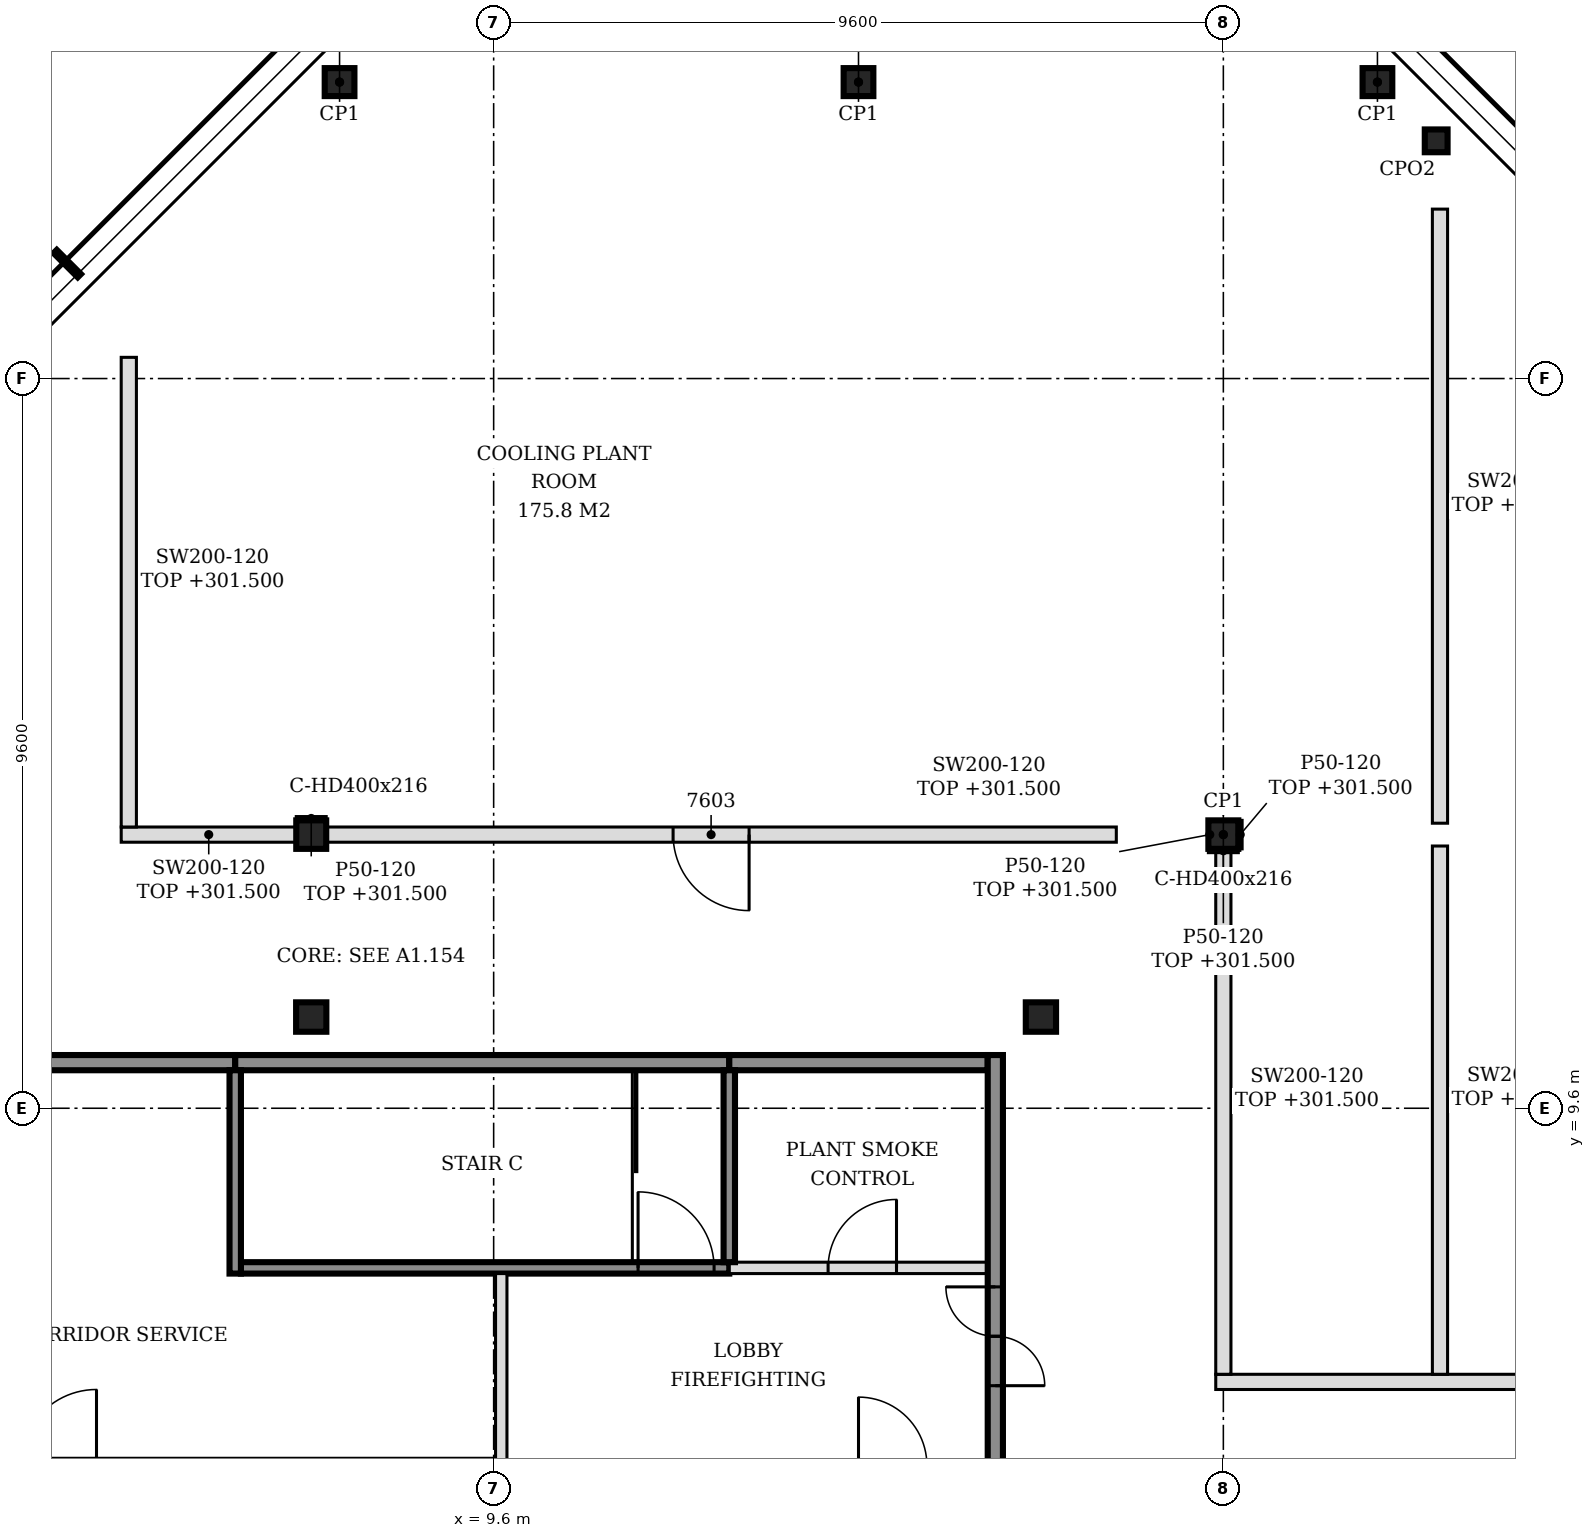
"""IFC4 building model, lengths in metres.
Left out: names, types, materials, properties, quantities, classifications, styles, units other than length and angle.
Written with IfcOpenShell. Run it as: python <this file> out.ifc"""

import sys

from ifc_helpers import new_model, si_unit, direction, frame, frame_2d, origin, origin_2d, place, context, subcontext, project, spatial, rectangle, hollow_rectangle, i_section, extrude, clip, halfspace, element, fill, save


model = new_model("IFC4")
c1 = context("Model", 3, precision=1e-05, world=origin(), true_north=direction((0.0, 1.0)))
c2 = subcontext(c1, "Body", "Model", "MODEL_VIEW")
j1 = project(units=[si_unit("LENGTHUNIT", "METRE"), si_unit("PLANEANGLEUNIT", "RADIAN")], contexts=[c1])
p1 = place(None, origin())
s1 = spatial("IfcSite", under=j1, at=p1, CompositionType="ELEMENT")
p2 = place(p1, origin())
s2 = spatial("IfcBuilding", under=s1, at=p2, CompositionType="ELEMENT")
p3 = place(p2, frame((0.0, 0.0, 295.8)))
s3 = spatial("IfcBuildingStorey", under=s2, at=p3, CompositionType="ELEMENT", Elevation=295.8)
p4 = place(p3, frame((22.0, 22.327, 5.7), z_axis=(0.0, 0.0, 1.0), x_axis=(1.0, 0.0, 0.0)))
e1 = element("IfcColumn", 1, at=p4, inside=s3, PredefinedType="COLUMN", context=c2, shape_type="SweptSolid", body=[
    extrude(hollow_rectangle(XDim=0.3, YDim=0.3, WallThickness=0.016, InnerFilletRadius=0.016, OuterFilletRadius=0.024, at=origin_2d()), origin(), (0.0, 0.0, 1.0), 12.323),
])
p5 = place(p3, frame((21.227, 23.1, 5.7), z_axis=(0.0, 0.0, 1.0), x_axis=(1.0, 0.0, 0.0)))
e2 = element("IfcColumn", 2, at=p5, inside=s3, PredefinedType="COLUMN", context=c2, shape_type="SweptSolid", body=[
    extrude(hollow_rectangle(XDim=0.3, YDim=0.3, WallThickness=0.016, InnerFilletRadius=0.016, OuterFilletRadius=0.024, at=origin_2d()), origin(), (0.0, 0.0, 1.0), 12.202),
])
p6 = place(p3, frame((14.4, 23.1, 5.7), z_axis=(0.0, 0.0, 1.0), x_axis=(1.0, 0.0, 0.0)))
e3 = element("IfcColumn", 3, at=p6, inside=s3, PredefinedType="COLUMN", context=c2, shape_type="SweptSolid", body=[
    extrude(hollow_rectangle(XDim=0.3, YDim=0.3, WallThickness=0.016, InnerFilletRadius=0.016, OuterFilletRadius=0.024, at=origin_2d()), origin(), (0.0, 0.0, 1.0), 9.491),
])
p7 = place(p3, frame((7.573, 23.1, 5.7), z_axis=(0.0, 0.0, 1.0), x_axis=(1.0, 0.0, 0.0)))
e4 = element("IfcColumn", 4, at=p7, inside=s3, PredefinedType="COLUMN", context=c2, shape_type="SweptSolid", body=[
    extrude(hollow_rectangle(XDim=0.3, YDim=0.3, WallThickness=0.016, InnerFilletRadius=0.016, OuterFilletRadius=0.024, at=origin_2d()), origin(), (0.0, 0.0, 1.0), 6.781),
])
p8 = place(p3, frame((7.2, 10.8, 5.7), z_axis=(0.0, 0.0, 1.0), x_axis=(1.0, 0.0, 0.0)))
e5 = element("IfcColumn", 5, at=p8, inside=s3, PredefinedType="COLUMN", context=c2, shape_type="SweptSolid", body=[
    extrude(hollow_rectangle(XDim=0.3, YDim=0.3, WallThickness=0.016, InnerFilletRadius=0.016, OuterFilletRadius=0.024, at=origin_2d()), origin(), (0.0, 0.0, 1.0), 6.632),
])
p9 = place(p3, frame((19.2, 13.2, 5.7), z_axis=(0.214971196898, 0.0, 0.97662038915), x_axis=(0.0, 1.0, 0.0)))
e6 = element("IfcColumn", 6, at=p9, inside=s3, PredefinedType="COLUMN", context=c2, shape_type="Clipping", body=[
    clip(extrude(hollow_rectangle(XDim=0.3, YDim=0.3, WallThickness=0.016, InnerFilletRadius=0.016, OuterFilletRadius=0.024, at=origin_2d()), origin(), (0.0, 0.0, 1.0), 13.025), halfspace(frame((0.0, 0.0, 0.032), z_axis=(0.0, 0.0, 1.0), x_axis=(1.0, 0.0, 0.0)), True)),
])
for number, where, z_axis, x_axis in (
    (7, (21.227, 23.1, -0.2), (0.0, 0.0, 1.0), (1.0, 0.0, 0.0)),
    (8, (14.4, 23.1, -0.2), (0.0, 0.0, 1.0), (1.0, 0.0, 0.0)),
    (9, (7.573, 23.1, -0.2), (0.0, 0.0, 1.0), (1.0, 0.0, 0.0)),
):
    element("IfcColumn", number, at=place(p3, frame(where, z_axis=z_axis, x_axis=x_axis)), inside=s3, PredefinedType="COLUMN", context=c2, shape_type="SweptSolid", body=[
        extrude(i_section(OverallWidth=0.391, OverallDepth=0.368, WebThickness=0.015, FlangeThickness=0.024, FilletRadius=0.015, at=origin_2d()), origin(), (0.0, 0.0, 1.0), 5.9),
    ])
for number, where, z_axis, x_axis in (
    (10, (7.2, 13.2, -0.2), (0.0, 0.0, 1.0), (1.0, 0.0, 0.0)),
    (11, (19.2, 13.2, -0.2), (0.0, 0.0, 1.0), (1.0, 0.0, 0.0)),
):
    element("IfcColumn", number, at=place(p3, frame(where, z_axis=z_axis, x_axis=x_axis)), inside=s3, PredefinedType="COLUMN", context=c2, shape_type="SweptSolid", body=[
        extrude(i_section(OverallWidth=0.394, OverallDepth=0.375, WebThickness=0.017, FlangeThickness=0.028, FilletRadius=0.015, at=origin_2d()), origin(), (0.0, 0.0, 1.0), 5.9),
    ])
for number, where, z_axis, x_axis in (
    (12, (7.2, 10.8, -0.2), (0.0, 0.0, 1.0), (1.0, 0.0, 0.0)),
    (13, (16.8, 10.8, -0.2), (0.0, 0.0, 1.0), (1.0, 0.0, 0.0)),
):
    element("IfcColumn", number, at=place(p3, frame(where, z_axis=z_axis, x_axis=x_axis)), inside=s3, PredefinedType="COLUMN", context=c2, shape_type="SweptSolid", body=[
        extrude(i_section(OverallWidth=0.398, OverallDepth=0.387, WebThickness=0.021, FlangeThickness=0.033, FilletRadius=0.015, at=origin_2d()), origin(), (0.0, 0.0, 1.0), 5.9),
    ])
p10 = place(p3, frame((6.275, 7.5, 0.0), z_axis=(0.0, 0.0, 1.0), x_axis=(1.0, 0.0, 0.0)))
e14 = element("IfcWall", 14, at=p10, inside=s3, PredefinedType="SOLIDWALL", context=c2, shape_type="SweptSolid", body=[
    extrude(rectangle(XDim=6.425, YDim=0.15, at=frame_2d((3.212, 0.0))), origin(), (0.0, 0.0, 1.0), 5.7),
])
p11 = place(p10, frame((5.225, 0.0, 0.0)))
e15 = element("IfcOpeningElement", 15, at=p11, cuts=e14, PredefinedType="OPENING", context=c2, shape_type="SweptSolid", body=[
    extrude(rectangle(XDim=1.0, YDim=2.1, at=frame_2d((0.5, 1.05))), frame((0.0, 0.085, 0.0), z_axis=(0.0, -1.0, 0.0), x_axis=(1.0, 0.0, 0.0)), (0.0, 0.0, 1.0), 0.17),
])
p12 = place(p3, frame((12.7, 7.5, 0.0), z_axis=(0.0, 0.0, 1.0), x_axis=(1.0, 0.0, 0.0)))
e16 = element("IfcWall", 16, at=p12, inside=s3, PredefinedType="SOLIDWALL", context=c2, shape_type="SweptSolid", body=[
    extrude(rectangle(XDim=3.4, YDim=0.15, at=frame_2d((1.7, 0.0))), origin(), (0.0, 0.0, 1.0), 5.7),
])
p13 = place(p12, frame((1.3, 0.0, 0.0)))
e17 = element("IfcOpeningElement", 17, at=p13, cuts=e16, PredefinedType="OPENING", context=c2, shape_type="SweptSolid", body=[
    extrude(rectangle(XDim=0.9, YDim=2.1, at=frame_2d((0.45, 1.05))), frame((0.0, 0.085, 0.0), z_axis=(0.0, -1.0, 0.0), x_axis=(1.0, 0.0, 0.0)), (0.0, 0.0, 1.0), 0.17),
])
p14 = place(p3, frame((-1.7, 10.2, 0.0), z_axis=(0.0, 0.0, 1.0), x_axis=(1.0, 0.0, 0.0)))
e18 = element("IfcWall", 18, at=p14, inside=s3, PredefinedType="SOLIDWALL", context=c2, shape_type="SweptSolid", body=[
    extrude(rectangle(XDim=7.9, YDim=0.2, at=frame_2d((3.95, 0.0))), origin(), (0.0, 0.0, 1.0), 5.7),
])
p15 = place(p3, frame((6.2, 10.2, 0.0), z_axis=(0.0, 0.0, 1.0), x_axis=(1.0, 0.0, 0.0)))
e19 = element("IfcWall", 19, at=p15, inside=s3, PredefinedType="SOLIDWALL", context=c2, shape_type="SweptSolid", body=[
    extrude(rectangle(XDim=6.5, YDim=0.2, at=frame_2d((3.25, 0.0))), origin(), (0.0, 0.0, 1.0), 5.7),
])
p16 = place(p3, frame((12.7, 10.2, 0.0), z_axis=(0.0, 0.0, 1.0), x_axis=(1.0, 0.0, 0.0)))
e20 = element("IfcWall", 20, at=p16, inside=s3, PredefinedType="SOLIDWALL", context=c2, shape_type="SweptSolid", body=[
    extrude(rectangle(XDim=3.4, YDim=0.2, at=frame_2d((1.7, 0.0))), origin(), (0.0, 0.0, 1.0), 5.7),
])
p17 = place(p3, frame((6.2, 7.425, 0.0), z_axis=(0.0, 0.0, 1.0), x_axis=(0.0, 1.0, 0.0)))
e21 = element("IfcWall", 21, at=p17, inside=s3, PredefinedType="SOLIDWALL", context=c2, shape_type="SweptSolid", body=[
    extrude(rectangle(XDim=2.675, YDim=0.15, at=frame_2d((1.337, 0.0))), origin(), (0.0, 0.0, 1.0), 5.7),
])
p18 = place(p3, frame((9.7, 4.975, 0.0), z_axis=(0.0, 0.0, 1.0), x_axis=(0.0, 1.0, 0.0)))
e22 = element("IfcWall", 22, at=p18, inside=s3, PredefinedType="SOLIDWALL", context=c2, shape_type="SweptSolid", body=[
    extrude(rectangle(XDim=2.45, YDim=0.15, at=frame_2d((1.225, 0.0))), origin(), (0.0, 0.0, 1.0), 5.7),
])
p19 = place(p3, frame((12.7, 7.575, 0.0), z_axis=(0.0, 0.0, 1.0), x_axis=(0.0, 1.0, 0.0)))
e23 = element("IfcWall", 23, at=p19, inside=s3, PredefinedType="SOLIDWALL", context=c2, shape_type="SweptSolid", body=[
    extrude(rectangle(XDim=2.525, YDim=0.15, at=frame_2d((1.263, 0.0))), origin(), (0.0, 0.0, 1.0), 5.7),
])
p20 = place(p3, frame((16.2, -5.5, 0.0), z_axis=(0.0, 0.0, 1.0), x_axis=(0.0, 1.0, 0.0)))
e24 = element("IfcWall", 24, at=p20, inside=s3, PredefinedType="SOLIDWALL", context=c2, shape_type="SweptSolid", body=[
    extrude(rectangle(XDim=15.8, YDim=0.2, at=frame_2d((7.9, 0.0))), origin(), (0.0, 0.0, 1.0), 5.7),
])
p21 = place(p20, frame((3.05, 0.0, 0.0)))
e25 = element("IfcOpeningElement", 25, at=p21, cuts=e24, PredefinedType="OPENING", context=c2, shape_type="SweptSolid", body=[
    extrude(rectangle(XDim=1.3, YDim=2.1, at=frame_2d((0.65, 1.05))), frame((0.0, 0.11, 0.0), z_axis=(0.0, -1.0, 0.0), x_axis=(1.0, 0.0, 0.0)), (0.0, 0.0, 1.0), 0.22),
])
p22 = place(p20, frame((11.45, 0.0, 0.0)))
e26 = element("IfcOpeningElement", 26, at=p22, cuts=e24, PredefinedType="OPENING", context=c2, shape_type="SweptSolid", body=[
    extrude(rectangle(XDim=1.3, YDim=2.1, at=frame_2d((0.65, 1.05))), frame((0.0, 0.11, 0.0), z_axis=(0.0, -1.0, 0.0), x_axis=(1.0, 0.0, 0.0)), (0.0, 0.0, 1.0), 0.22),
])
p23 = place(p3, frame((19.1, 6.0, 0.0), z_axis=(0.0, 0.0, 1.0), x_axis=(1.0, 0.0, 0.0)))
e27 = element("IfcWall", 27, at=p23, inside=s3, PredefinedType="PARTITIONING", context=c2, shape_type="SweptSolid", body=[
    extrude(rectangle(XDim=18.379, YDim=0.2, at=frame_2d((9.189, 0.0))), origin(), (0.0, 0.0, 1.0), 5.7),
])
p24 = place(p23, frame((10.164, 0.0, 0.0)))
e28 = element("IfcOpeningElement", 28, at=p24, cuts=e27, PredefinedType="OPENING", context=c2, shape_type="SweptSolid", body=[
    extrude(rectangle(XDim=1.0, YDim=2.1, at=frame_2d((0.5, 1.05))), frame((0.0, 0.11, 0.0), z_axis=(0.0, -1.0, 0.0), x_axis=(1.0, 0.0, 0.0)), (0.0, 0.0, 1.0), 0.22),
])
p25 = place(p3, frame((19.2, 6.1, 0.0), z_axis=(0.0, 0.0, 1.0), x_axis=(0.0, 1.0, 0.0)))
e29 = element("IfcWall", 29, at=p25, inside=s3, PredefinedType="PARTITIONING", context=c2, shape_type="SweptSolid", body=[
    extrude(rectangle(XDim=6.912, YDim=0.2, at=frame_2d((3.456, 0.0))), origin(), (0.0, 0.0, 1.0), 5.7),
])
p26 = place(p3, frame((22.05, 6.1, 0.0), z_axis=(0.0, 0.0, 1.0), x_axis=(0.0, 1.0, 0.0)))
e30 = element("IfcWall", 30, at=p26, inside=s3, PredefinedType="PARTITIONING", context=c2, shape_type="SweptSolid", body=[
    extrude(rectangle(XDim=6.95, YDim=0.2, at=frame_2d((3.475, 0.0))), origin(), (0.0, 0.0, 1.0), 5.7),
])
p27 = place(p3, frame((4.7, 13.2, 0.0), z_axis=(0.0, 0.0, 1.0), x_axis=(1.0, 0.0, 0.0)))
e31 = element("IfcWall", 31, at=p27, inside=s3, PredefinedType="PARTITIONING", context=c2, shape_type="SweptSolid", body=[
    extrude(rectangle(XDim=2.303, YDim=0.2, at=frame_2d((1.151, 0.0))), origin(), (0.0, 0.0, 1.0), 5.7),
])
p28 = place(p3, frame((7.397, 13.2, 0.0), z_axis=(0.0, 0.0, 1.0), x_axis=(1.0, 0.0, 0.0)))
e32 = element("IfcWall", 32, at=p28, inside=s3, PredefinedType="PARTITIONING", context=c2, shape_type="SweptSolid", body=[
    extrude(rectangle(XDim=10.395, YDim=0.2, at=frame_2d((5.197, 0.0))), origin(), (0.0, 0.0, 1.0), 5.7),
])
p29 = place(p28, frame((4.564, 0.0, 0.0)))
e33 = element("IfcOpeningElement", 33, at=p29, cuts=e32, PredefinedType="OPENING", context=c2, shape_type="SweptSolid", body=[
    extrude(rectangle(XDim=1.0, YDim=2.1, at=frame_2d((0.5, 1.05))), frame((0.0, 0.11, 0.0), z_axis=(0.0, -1.0, 0.0), x_axis=(1.0, 0.0, 0.0)), (0.0, 0.0, 1.0), 0.22),
])
p30 = place(p3, frame((4.8, 13.3, 0.0), z_axis=(0.0, 0.0, 1.0), x_axis=(0.0, 1.0, 0.0)))
e34 = element("IfcWall", 34, at=p30, inside=s3, PredefinedType="PARTITIONING", context=c2, shape_type="SweptSolid", body=[
    extrude(rectangle(XDim=6.179, YDim=0.2, at=frame_2d((3.089, 0.0))), origin(), (0.0, 0.0, 1.0), 5.7),
])
p31 = place(p3, frame((22.05, 13.35, 0.0), z_axis=(0.0, 0.0, 1.0), x_axis=(0.0, 1.0, 0.0)))
e35 = element("IfcWall", 35, at=p31, inside=s3, PredefinedType="PARTITIONING", context=c2, shape_type="SweptSolid", body=[
    extrude(rectangle(XDim=8.079, YDim=0.2, at=frame_2d((4.04, 0.0))), origin(), (0.0, 0.0, 1.0), 5.7),
])
p32 = place(p3, frame((19.422, 13.012, 0.0), z_axis=(0.0, 0.0, 1.0), x_axis=(0.0, 1.0, 0.0)))
e36 = element("IfcWall", 36, at=p32, inside=s3, PredefinedType="PARTITIONING", context=c2, shape_type="SweptSolid", body=[
    extrude(rectangle(XDim=0.375, YDim=0.05, at=frame_2d((0.188, 0.0))), origin(), (0.0, 0.0, 1.0), 5.7),
])
p33 = place(p3, frame((19.021, 13.05, 0.0), z_axis=(0.0, 0.0, 1.0), x_axis=(0.0, 1.0, 0.0)))
e37 = element("IfcWall", 37, at=p33, inside=s3, PredefinedType="PARTITIONING", context=c2, shape_type="SweptSolid", body=[
    extrude(rectangle(XDim=0.3, YDim=0.05, at=frame_2d((0.15, 0.0))), origin(), (0.0, 0.0, 1.0), 5.7),
])
for number, where, z_axis, x_axis in (
    (38, (7.003, 13.413, 0.0), (0.0, 0.0, 1.0), (1.0, 0.0, 0.0)),
    (39, (19.003, 12.988, 0.0), (0.0, 0.0, 1.0), (1.0, 0.0, 0.0)),
):
    element("IfcWall", number, at=place(p3, frame(where, z_axis=z_axis, x_axis=x_axis)), inside=s3, PredefinedType="PARTITIONING", context=c2, shape_type="SweptSolid", body=[
        extrude(rectangle(XDim=0.394, YDim=0.05, at=frame_2d((0.197, 0.0))), origin(), (0.0, 0.0, 1.0), 5.7),
    ])
p34 = place(p11, origin())
e40 = element("IfcDoor", 40, at=p34, inside=s3, OperationType="SINGLE_SWING_LEFT", PredefinedType="DOOR", context=c2, shape_type="SweptSolid", body=[
    extrude(rectangle(XDim=1.0, YDim=2.1, at=frame_2d((0.5, 1.05))), frame((0.0, 0.025, 0.0), z_axis=(0.0, -1.0, 0.0), x_axis=(1.0, 0.0, 0.0)), (0.0, 0.0, 1.0), 0.05),
])
fill(e15, e40)
p35 = place(p22, origin())
e41 = element("IfcDoor", 41, at=p35, inside=s3, OperationType="DOUBLE_DOOR_SINGLE_SWING", PredefinedType="DOOR", context=c2, shape_type="SweptSolid", body=[
    extrude(rectangle(XDim=1.3, YDim=2.1, at=frame_2d((0.65, 1.05))), frame((0.0, 0.025, 0.0), z_axis=(0.0, -1.0, 0.0), x_axis=(1.0, 0.0, 0.0)), (0.0, 0.0, 1.0), 0.05),
])
fill(e26, e41)
p36 = place(p13, origin())
e42 = element("IfcDoor", 42, at=p36, inside=s3, OperationType="SINGLE_SWING_RIGHT", PredefinedType="DOOR", context=c2, shape_type="SweptSolid", body=[
    extrude(rectangle(XDim=0.9, YDim=2.1, at=frame_2d((0.45, 1.05))), frame((0.0, 0.025, 0.0), z_axis=(0.0, -1.0, 0.0), x_axis=(1.0, 0.0, 0.0)), (0.0, 0.0, 1.0), 0.05),
])
fill(e17, e42)
p37 = place(p29, frame((1.0, 0.0, 0.0), z_axis=(0.0, 0.0, 1.0), x_axis=(-1.0, 0.0, 0.0)))
e43 = element("IfcDoor", 43, at=p37, inside=s3, OperationType="SINGLE_SWING_LEFT", PredefinedType="DOOR", context=c2, shape_type="SweptSolid", body=[
    extrude(rectangle(XDim=1.0, YDim=2.1, at=frame_2d((0.5, 1.05))), frame((0.0, 0.025, 0.0), z_axis=(0.0, -1.0, 0.0), x_axis=(1.0, 0.0, 0.0)), (0.0, 0.0, 1.0), 0.05),
])
fill(e33, e43)
save(model, sys.argv[1])
